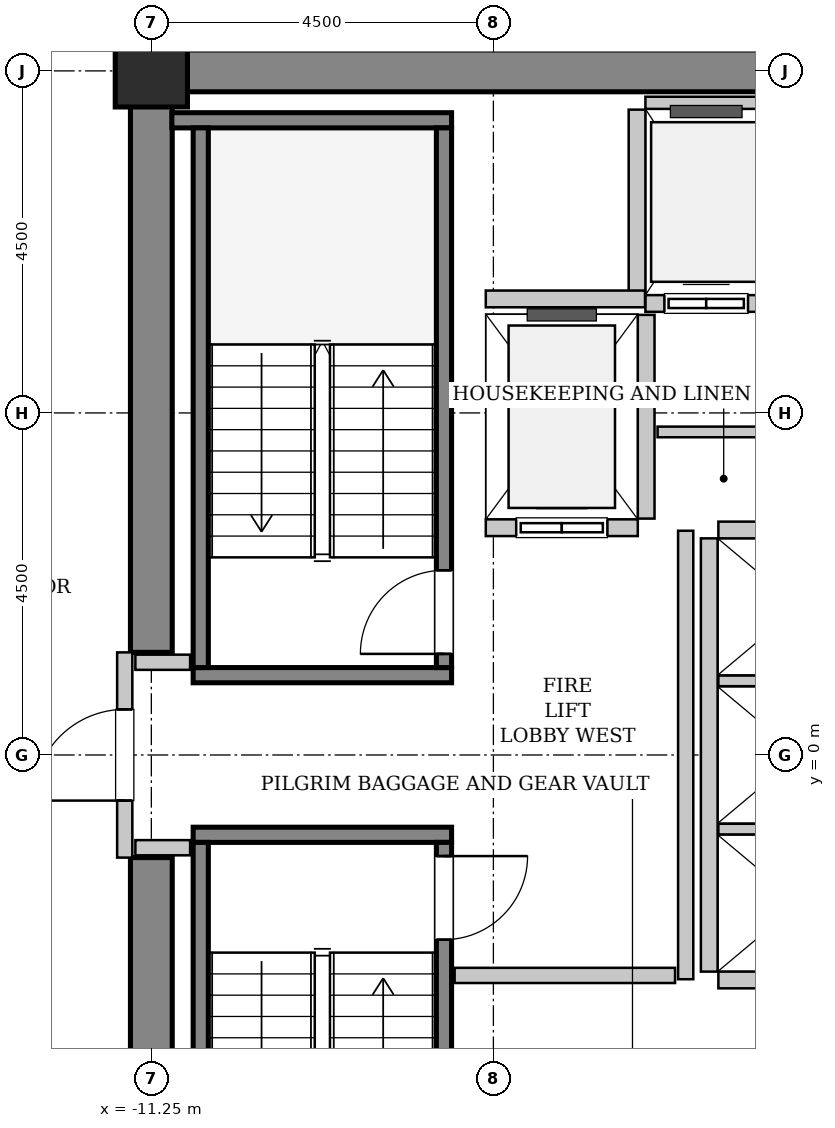
"""IFC4 building model, lengths in metres.
Left out: names, types, materials, properties, quantities, classifications, styles, units other than length and angle.
Written with IfcOpenShell. Run it as: python <this file> out.ifc"""

import sys

from ifc_helpers import new_model, si_unit, direction, frame, frame_2d, origin, origin_2d, place, context, subcontext, project, spatial, rectangle, hollow_rectangle, extrude, source, transform, mapped, element, fill, save


model = new_model("IFC4")
c1 = context("Model", 3, precision=1e-05, world=origin(), true_north=direction((0.0, 1.0)))
c2 = subcontext(c1, "Body", "Model", "MODEL_VIEW")
j1 = project(units=[si_unit("LENGTHUNIT", "METRE"), si_unit("PLANEANGLEUNIT", "RADIAN")], contexts=[c1])
p1 = place(None, origin())
s1 = spatial("IfcSite", under=j1, at=p1, CompositionType="ELEMENT")
p2 = place(p1, origin())
s2 = spatial("IfcBuilding", under=s1, at=p2, CompositionType="ELEMENT")
p3 = place(p2, frame((0.0, 0.0, 128.8)))
s3 = spatial("IfcBuildingStorey", under=s2, at=p3, CompositionType="ELEMENT", Elevation=128.8)
m1 = source(origin(), c2, "Body", "SweptSolid", [
    extrude(rectangle(XDim=9.975, YDim=0.55, at=frame_2d((4.987, 0.0))), origin(), (0.0, 0.0, 1.0), 3.8),
])
p4 = place(p3, frame((-11.525, 9.0, 0.0), z_axis=(0.0, 0.0, 1.0), x_axis=(1.0, 0.0, 0.0)))
e1 = element("IfcWall", 1, at=p4, inside=s3, PredefinedType="SHEAR", context=c2, shape_type="MappedRepresentation", body=[
    mapped(m1, transform((0.0, 0.0, 0.0), x_axis=(1.0, 0.0, 0.0), y_axis=(0.0, 1.0, 0.0), z_axis=(0.0, 0.0, 1.0), scale=1.0)),
])
m2 = source(origin(), c2, "Body", "SweptSolid", [
    extrude(rectangle(XDim=7.375, YDim=0.55, at=frame_2d((3.688, 0.0))), origin(), (0.0, 0.0, 1.0), 3.8),
])
for number, where, z_axis, x_axis in (
    (2, (-11.25, -8.725, 0.0), (0.0, 0.0, 1.0), (0.0, 1.0, 0.0)),
    (3, (-11.25, 1.35, 0.0), (0.0, 0.0, 1.0), (0.0, 1.0, 0.0)),
):
    element("IfcWall", number, at=place(p3, frame(where, z_axis=z_axis, x_axis=x_axis)), inside=s3, PredefinedType="SHEAR", context=c2, shape_type="MappedRepresentation", body=[
        mapped(m2, transform((0.0, 0.0, 0.0), x_axis=(1.0, 0.0, 0.0), y_axis=(0.0, 1.0, 0.0), z_axis=(0.0, 0.0, 1.0), scale=1.0)),
    ])
m3 = source(origin(), c2, "Body", "SweptSolid", [
    extrude(hollow_rectangle(XDim=0.95, YDim=0.95, WallThickness=0.045, InnerFilletRadius=0.045, OuterFilletRadius=0.09, at=origin_2d()), origin(), (0.0, 0.0, 1.0), 3.8),
])
p5 = place(p3, frame((-11.25, 9.0, 0.0), z_axis=(0.0, 0.0, 1.0), x_axis=(1.0, 0.0, 0.0)))
e4 = element("IfcColumn", 4, at=p5, inside=s3, PredefinedType="COLUMN", context=c2, shape_type="MappedRepresentation", body=[
    mapped(m3, transform((0.0, 0.0, 0.0), x_axis=(1.0, 0.0, 0.0), y_axis=(0.0, 1.0, 0.0), z_axis=(0.0, 0.0, 1.0), scale=1.0)),
])
m4 = source(origin(), c2, "Body", "SweptSolid", [
    extrude(rectangle(XDim=3.4, YDim=0.2, at=frame_2d((1.7, 0.0))), origin(), (0.0, 0.0, 1.0), 3.8),
])
p6 = place(p3, frame((-7.3, 1.05, 0.0), z_axis=(0.0, 0.0, 1.0), x_axis=(-1.0, 0.0, 0.0)))
e5 = element("IfcWall", 5, at=p6, inside=s3, PredefinedType="SOLIDWALL", context=c2, shape_type="MappedRepresentation", body=[
    mapped(m4, transform((0.0, 0.0, 0.0), x_axis=(1.0, 0.0, 0.0), y_axis=(0.0, 1.0, 0.0), z_axis=(0.0, 0.0, 1.0), scale=1.0)),
])
m5 = source(origin(), c2, "Body", "SweptSolid", [
    extrude(rectangle(XDim=3.68, YDim=0.2, at=frame_2d((1.84, 0.0))), origin(), (0.0, 0.0, 1.0), 3.8),
])
p7 = place(p3, frame((-7.3, 8.35, 0.0), z_axis=(0.0, 0.0, 1.0), x_axis=(-1.0, 0.0, 0.0)))
e6 = element("IfcWall", 6, at=p7, inside=s3, PredefinedType="SOLIDWALL", context=c2, shape_type="MappedRepresentation", body=[
    mapped(m5, transform((0.0, 0.0, 0.0), x_axis=(1.0, 0.0, 0.0), y_axis=(0.0, 1.0, 0.0), z_axis=(0.0, 0.0, 1.0), scale=1.0)),
])
m6 = source(origin(), c2, "Body", "SweptSolid", [
    extrude(rectangle(XDim=7.1, YDim=0.2, at=frame_2d((3.55, 0.0))), origin(), (0.0, 0.0, 1.0), 3.8),
])
p8 = place(p3, frame((-7.4, 1.15, 0.0), z_axis=(0.0, 0.0, 1.0), x_axis=(0.0, 1.0, 0.0)))
e7 = element("IfcWall", 7, at=p8, inside=s3, PredefinedType="SOLIDWALL", context=c2, shape_type="MappedRepresentation", body=[
    mapped(m6, transform((0.0, 0.0, 0.0), x_axis=(1.0, 0.0, 0.0), y_axis=(0.0, 1.0, 0.0), z_axis=(0.0, 0.0, 1.0), scale=1.0)),
])
p9 = place(p8, frame((0.18, 0.0, 0.0)))
e8 = element("IfcOpeningElement", 8, at=p9, cuts=e7, PredefinedType="OPENING", context=c2, shape_type="SweptSolid", body=[
    extrude(rectangle(XDim=1.1, YDim=2.15, at=frame_2d((0.55, 1.075))), frame((0.0, 0.11, 0.0), z_axis=(0.0, -1.0, 0.0), x_axis=(1.0, 0.0, 0.0)), (0.0, 0.0, 1.0), 0.22),
])
p10 = place(p3, frame((-10.6, 1.15, 0.0), z_axis=(0.0, 0.0, 1.0), x_axis=(0.0, 1.0, 0.0)))
e9 = element("IfcWall", 9, at=p10, inside=s3, PredefinedType="SOLIDWALL", context=c2, shape_type="MappedRepresentation", body=[
    mapped(m6, transform((0.0, 0.0, 0.0), x_axis=(1.0, 0.0, 0.0), y_axis=(0.0, 1.0, 0.0), z_axis=(0.0, 0.0, 1.0), scale=1.0)),
])
p11 = place(p3, frame((-10.7, -1.05, 0.0), z_axis=(0.0, 0.0, 1.0), x_axis=(1.0, 0.0, 0.0)))
e10 = element("IfcWall", 10, at=p11, inside=s3, PredefinedType="SOLIDWALL", context=c2, shape_type="MappedRepresentation", body=[
    mapped(m4, transform((0.0, 0.0, 0.0), x_axis=(1.0, 0.0, 0.0), y_axis=(0.0, 1.0, 0.0), z_axis=(0.0, 0.0, 1.0), scale=1.0)),
])
p12 = place(p3, frame((-10.6, -1.15, 0.0), z_axis=(0.0, 0.0, 1.0), x_axis=(0.0, -1.0, 0.0)))
e11 = element("IfcWall", 11, at=p12, inside=s3, PredefinedType="SOLIDWALL", context=c2, shape_type="MappedRepresentation", body=[
    mapped(m6, transform((0.0, 0.0, 0.0), x_axis=(1.0, 0.0, 0.0), y_axis=(0.0, 1.0, 0.0), z_axis=(0.0, 0.0, 1.0), scale=1.0)),
])
p13 = place(p3, frame((-7.4, -1.15, 0.0), z_axis=(0.0, 0.0, 1.0), x_axis=(0.0, -1.0, 0.0)))
e12 = element("IfcWall", 12, at=p13, inside=s3, PredefinedType="SOLIDWALL", context=c2, shape_type="MappedRepresentation", body=[
    mapped(m6, transform((0.0, 0.0, 0.0), x_axis=(1.0, 0.0, 0.0), y_axis=(0.0, 1.0, 0.0), z_axis=(0.0, 0.0, 1.0), scale=1.0)),
])
p14 = place(p13, frame((0.18, 0.0, 0.0)))
e13 = element("IfcOpeningElement", 13, at=p14, cuts=e12, PredefinedType="OPENING", context=c2, shape_type="SweptSolid", body=[
    extrude(rectangle(XDim=1.1, YDim=2.15, at=frame_2d((0.55, 1.075))), frame((0.0, 0.11, 0.0), z_axis=(0.0, -1.0, 0.0), x_axis=(1.0, 0.0, 0.0)), (0.0, 0.0, 1.0), 0.22),
])
m7 = source(origin(), c2, "Body", "SweptSolid", [
    extrude(rectangle(XDim=2.0, YDim=0.22, at=frame_2d((1.0, 0.0))), origin(), (0.0, 0.0, 1.0), 3.535),
])
p15 = place(p3, frame((-6.85, 2.99, 0.0), z_axis=(0.0, 0.0, 1.0), x_axis=(1.0, 0.0, 0.0)))
e14 = element("IfcWall", 14, at=p15, inside=s3, PredefinedType="SOLIDWALL", context=c2, shape_type="MappedRepresentation", body=[
    mapped(m7, transform((0.0, 0.0, 0.0), x_axis=(1.0, 0.0, 0.0), y_axis=(0.0, 1.0, 0.0), z_axis=(0.0, 0.0, 1.0), scale=1.0)),
])
p16 = place(p15, frame((0.4, 0.0, 0.0)))
e15 = element("IfcOpeningElement", 15, at=p16, cuts=e14, PredefinedType="OPENING", context=c2, shape_type="SweptSolid", body=[
    extrude(rectangle(XDim=1.2, YDim=2.2, at=frame_2d((0.6, 1.1))), frame((0.0, 0.12, 0.0), z_axis=(0.0, -1.0, 0.0), x_axis=(1.0, 0.0, 0.0)), (0.0, 0.0, 1.0), 0.24),
])
m8 = source(origin(), c2, "Body", "SweptSolid", [
    extrude(rectangle(XDim=2.68, YDim=0.22, at=frame_2d((1.34, 0.0))), origin(), (0.0, 0.0, 1.0), 3.535),
])
p17 = place(p3, frame((-4.74, 3.11, 0.0), z_axis=(0.0, 0.0, 1.0), x_axis=(0.0, 1.0, 0.0)))
e16 = element("IfcWall", 16, at=p17, inside=s3, PredefinedType="SOLIDWALL", context=c2, shape_type="MappedRepresentation", body=[
    mapped(m8, transform((0.0, 0.0, 0.0), x_axis=(1.0, 0.0, 0.0), y_axis=(0.0, 1.0, 0.0), z_axis=(0.0, 0.0, 1.0), scale=1.0)),
])
m9 = source(origin(), c2, "Body", "SweptSolid", [
    extrude(rectangle(XDim=3.2, YDim=0.22, at=frame_2d((1.6, 0.0))), origin(), (0.0, 0.0, 1.0), 3.535),
])
p18 = place(p3, frame((-4.75, 5.94, 0.0), z_axis=(0.0, 0.0, 1.0), x_axis=(1.0, 0.0, 0.0)))
e17 = element("IfcWall", 17, at=p18, inside=s3, PredefinedType="SOLIDWALL", context=c2, shape_type="MappedRepresentation", body=[
    mapped(m9, transform((0.0, 0.0, 0.0), x_axis=(1.0, 0.0, 0.0), y_axis=(0.0, 1.0, 0.0), z_axis=(0.0, 0.0, 1.0), scale=1.0)),
])
p19 = place(p18, frame((0.25, 0.0, 0.0)))
e18 = element("IfcOpeningElement", 18, at=p19, cuts=e17, PredefinedType="OPENING", context=c2, shape_type="SweptSolid", body=[
    extrude(rectangle(XDim=1.1, YDim=2.2, at=frame_2d((0.55, 1.1))), frame((0.0, 0.12, 0.0), z_axis=(0.0, -1.0, 0.0), x_axis=(1.0, 0.0, 0.0)), (0.0, 0.0, 1.0), 0.24),
])
p20 = place(p18, frame((1.875, 0.0, 0.0)))
e19 = element("IfcOpeningElement", 19, at=p20, cuts=e17, PredefinedType="OPENING", context=c2, shape_type="SweptSolid", body=[
    extrude(rectangle(XDim=1.1, YDim=2.2, at=frame_2d((0.55, 1.1))), frame((0.0, 0.12, 0.0), z_axis=(0.0, -1.0, 0.0), x_axis=(1.0, 0.0, 0.0)), (0.0, 0.0, 1.0), 0.24),
])
m10 = source(origin(), c2, "Body", "SweptSolid", [
    extrude(rectangle(XDim=3.2, YDim=0.16, at=frame_2d((1.6, 0.0))), origin(), (0.0, 0.0, 1.0), 2.425),
])
p21 = place(p3, frame((-1.55, 8.58, 0.0), z_axis=(0.0, 0.0, 1.0), x_axis=(-1.0, 0.0, 0.0)))
e20 = element("IfcWall", 20, at=p21, inside=s3, PredefinedType="PARTITIONING", context=c2, shape_type="MappedRepresentation", body=[
    mapped(m10, transform((0.0, 0.0, 0.0), x_axis=(1.0, 0.0, 0.0), y_axis=(0.0, 1.0, 0.0), z_axis=(0.0, 0.0, 1.0), scale=1.0)),
])
m11 = source(origin(), c2, "Body", "SweptSolid", [
    extrude(rectangle(XDim=2.43, YDim=0.22, at=frame_2d((1.215, 0.0))), origin(), (0.0, 0.0, 1.0), 3.535),
])
p22 = place(p3, frame((-4.86, 8.49, 0.0), z_axis=(0.0, 0.0, 1.0), x_axis=(0.0, -1.0, 0.0)))
e21 = element("IfcWall", 21, at=p22, inside=s3, PredefinedType="SOLIDWALL", context=c2, shape_type="MappedRepresentation", body=[
    mapped(m11, transform((0.0, 0.0, 0.0), x_axis=(1.0, 0.0, 0.0), y_axis=(0.0, 1.0, 0.0), z_axis=(0.0, 0.0, 1.0), scale=1.0)),
])
m12 = source(origin(), c2, "Body", "SweptSolid", [
    extrude(rectangle(XDim=5.7, YDim=0.22, at=frame_2d((2.85, 0.0))), origin(), (0.0, 0.0, 1.0), 3.535),
])
p23 = place(p3, frame((-3.91, 2.85, 0.0), z_axis=(0.0, 0.0, 1.0), x_axis=(0.0, -1.0, 0.0)))
e22 = element("IfcWall", 22, at=p23, inside=s3, PredefinedType="SOLIDWALL", context=c2, shape_type="MappedRepresentation", body=[
    mapped(m12, transform((0.0, 0.0, 0.0), x_axis=(1.0, 0.0, 0.0), y_axis=(0.0, 1.0, 0.0), z_axis=(0.0, 0.0, 1.0), scale=1.0)),
])
m13 = source(origin(), c2, "Body", "SweptSolid", [
    extrude(rectangle(XDim=2.13, YDim=0.22, at=frame_2d((1.065, 0.0))), origin(), (0.0, 0.0, 1.0), 3.535),
])
p24 = place(p3, frame((-3.79, -2.96, 0.0), z_axis=(0.0, 0.0, 1.0), x_axis=(1.0, 0.0, 0.0)))
e23 = element("IfcWall", 23, at=p24, inside=s3, PredefinedType="SOLIDWALL", context=c2, shape_type="MappedRepresentation", body=[
    mapped(m13, transform((0.0, 0.0, 0.0), x_axis=(1.0, 0.0, 0.0), y_axis=(0.0, 1.0, 0.0), z_axis=(0.0, 0.0, 1.0), scale=1.0)),
])
m14 = source(origin(), c2, "Body", "SweptSolid", [
    extrude(rectangle(XDim=2.13, YDim=0.14, at=frame_2d((1.065, 0.0))), origin(), (0.0, 0.0, 1.0), 3.535),
])
for number, where, z_axis, x_axis in (
    (24, (-3.79, -0.975, 0.0), (0.0, 0.0, 1.0), (1.0, 0.0, 0.0)),
    (25, (-3.79, 0.975, 0.0), (0.0, 0.0, 1.0), (1.0, 0.0, 0.0)),
):
    element("IfcWall", number, at=place(p3, frame(where, z_axis=z_axis, x_axis=x_axis)), inside=s3, PredefinedType="PARTITIONING", context=c2, shape_type="MappedRepresentation", body=[
        mapped(m14, transform((0.0, 0.0, 0.0), x_axis=(1.0, 0.0, 0.0), y_axis=(0.0, 1.0, 0.0), z_axis=(0.0, 0.0, 1.0), scale=1.0)),
    ])
p25 = place(p3, frame((-1.66, 2.96, 0.0), z_axis=(0.0, 0.0, 1.0), x_axis=(-1.0, 0.0, 0.0)))
e26 = element("IfcWall", 26, at=p25, inside=s3, PredefinedType="SOLIDWALL", context=c2, shape_type="MappedRepresentation", body=[
    mapped(m13, transform((0.0, 0.0, 0.0), x_axis=(1.0, 0.0, 0.0), y_axis=(0.0, 1.0, 0.0), z_axis=(0.0, 0.0, 1.0), scale=1.0)),
])
m15 = source(origin(), c2, "Body", "SweptSolid", [
    extrude(rectangle(XDim=2.095, YDim=0.22, at=frame_2d((1.048, 0.0))), origin(), (0.0, 0.0, 1.0), 3.535),
])
p26 = place(p3, frame((-6.85, 6.0, 0.0), z_axis=(0.0, 0.0, 1.0), x_axis=(1.0, 0.0, 0.0)))
e27 = element("IfcWall", 27, at=p26, inside=s3, PredefinedType="SOLIDWALL", context=c2, shape_type="MappedRepresentation", body=[
    mapped(m15, transform((0.0, 0.0, 0.0), x_axis=(1.0, 0.0, 0.0), y_axis=(0.0, 1.0, 0.0), z_axis=(0.0, 0.0, 1.0), scale=1.0)),
])
m16 = source(origin(), c2, "Body", "SweptSolid", [
    extrude(rectangle(XDim=2.7, YDim=0.2, at=frame_2d((1.35, 0.0))), origin(), (0.0, 0.0, 1.0), 2.425),
])
p27 = place(p3, frame((-11.6, -1.35, 0.0), z_axis=(0.0, 0.0, 1.0), x_axis=(0.0, 1.0, 0.0)))
e28 = element("IfcWall", 28, at=p27, inside=s3, PredefinedType="PARTITIONING", context=c2, shape_type="MappedRepresentation", body=[
    mapped(m16, transform((0.0, 0.0, 0.0), x_axis=(1.0, 0.0, 0.0), y_axis=(0.0, 1.0, 0.0), z_axis=(0.0, 0.0, 1.0), scale=1.0)),
])
p28 = place(p27, frame((0.75, 0.0, 0.0)))
e29 = element("IfcOpeningElement", 29, at=p28, cuts=e28, PredefinedType="OPENING", context=c2, shape_type="SweptSolid", body=[
    extrude(rectangle(XDim=1.2, YDim=2.15, at=frame_2d((0.6, 1.075))), frame((0.0, 0.11, 0.0), z_axis=(0.0, -1.0, 0.0), x_axis=(1.0, 0.0, 0.0)), (0.0, 0.0, 1.0), 0.22),
])
m17 = source(origin(), c2, "Body", "SweptSolid", [
    extrude(rectangle(XDim=5.9, YDim=0.2, at=frame_2d((2.95, 0.0))), origin(), (0.0, 0.0, 1.0), 3.535),
])
p29 = place(p3, frame((-4.22, -2.95, 0.0), z_axis=(0.0, 0.0, 1.0), x_axis=(0.0, 1.0, 0.0)))
e30 = element("IfcWall", 30, at=p29, inside=s3, PredefinedType="PARTITIONING", context=c2, shape_type="MappedRepresentation", body=[
    mapped(m17, transform((0.0, 0.0, 0.0), x_axis=(1.0, 0.0, 0.0), y_axis=(0.0, 1.0, 0.0), z_axis=(0.0, 0.0, 1.0), scale=1.0)),
])
m18 = source(origin(), c2, "Body", "SweptSolid", [
    extrude(rectangle(XDim=2.9, YDim=0.2, at=frame_2d((1.45, 0.0))), origin(), (0.0, 0.0, 1.0), 3.535),
])
p30 = place(p3, frame((-7.26, -2.9, 0.0), z_axis=(0.0, 0.0, 1.0), x_axis=(1.0, 0.0, 0.0)))
e31 = element("IfcWall", 31, at=p30, inside=s3, PredefinedType="PARTITIONING", context=c2, shape_type="MappedRepresentation", body=[
    mapped(m18, transform((0.0, 0.0, 0.0), x_axis=(1.0, 0.0, 0.0), y_axis=(0.0, 1.0, 0.0), z_axis=(0.0, 0.0, 1.0), scale=1.0)),
])
m19 = source(origin(), c2, "Body", "SweptSolid", [
    extrude(rectangle(XDim=0.72, YDim=0.2, at=frame_2d((0.36, 0.0))), origin(), (0.0, 0.0, 1.0), 3.535),
])
for number, where, z_axis, x_axis in (
    (32, (-11.46, 1.22, 0.0), (0.0, 0.0, 1.0), (1.0, 0.0, 0.0)),
    (33, (-11.46, -1.22, 0.0), (0.0, 0.0, 1.0), (1.0, 0.0, 0.0)),
):
    element("IfcWall", number, at=place(p3, frame(where, z_axis=z_axis, x_axis=x_axis)), inside=s3, PredefinedType="PARTITIONING", context=c2, shape_type="MappedRepresentation", body=[
        mapped(m19, transform((0.0, 0.0, 0.0), x_axis=(1.0, 0.0, 0.0), y_axis=(0.0, 1.0, 0.0), z_axis=(0.0, 0.0, 1.0), scale=1.0)),
    ])
m20 = source(origin(), c2, "Body", "SweptSolid", [
    extrude(rectangle(XDim=2.95, YDim=0.14, at=frame_2d((1.475, 0.0))), origin(), (0.0, 0.0, 1.0), 3.535),
])
p31 = place(p3, frame((-4.59, 4.25, 0.0), z_axis=(0.0, 0.0, 1.0), x_axis=(1.0, 0.0, 0.0)))
e34 = element("IfcWall", 34, at=p31, inside=s3, PredefinedType="PARTITIONING", context=c2, shape_type="MappedRepresentation", body=[
    mapped(m20, transform((0.0, 0.0, 0.0), x_axis=(1.0, 0.0, 0.0), y_axis=(0.0, 1.0, 0.0), z_axis=(0.0, 0.0, 1.0), scale=1.0)),
])
m21 = source(origin(), c2, "Body", "SweptSolid", [
    extrude(rectangle(XDim=1.1, YDim=2.15, at=frame_2d((0.55, 1.075))), frame((0.0, 0.025, 0.0), z_axis=(0.0, -1.0, 0.0), x_axis=(1.0, 0.0, 0.0)), (0.0, 0.0, 1.0), 0.05),
])
p32 = place(p9, origin())
e35 = element("IfcDoor", 35, at=p32, inside=s3, OperationType="SINGLE_SWING_LEFT", PredefinedType="DOOR", context=c2, shape_type="MappedRepresentation", body=[
    mapped(m21, transform((0.0, 0.0, 0.0), x_axis=(1.0, 0.0, 0.0), y_axis=(0.0, 1.0, 0.0), z_axis=(0.0, 0.0, 1.0), scale=1.0)),
])
fill(e8, e35)
p33 = place(p14, origin())
e36 = element("IfcDoor", 36, at=p33, inside=s3, OperationType="SINGLE_SWING_LEFT", PredefinedType="DOOR", context=c2, shape_type="MappedRepresentation", body=[
    mapped(m21, transform((0.0, 0.0, 0.0), x_axis=(1.0, 0.0, 0.0), y_axis=(0.0, 1.0, 0.0), z_axis=(0.0, 0.0, 1.0), scale=1.0)),
])
fill(e13, e36)
m22 = source(origin(), c2, "Body", "SweptSolid", [
    extrude(rectangle(XDim=1.2, YDim=2.2, at=frame_2d((0.6, 1.1))), frame((0.0, 0.025, 0.0), z_axis=(0.0, -1.0, 0.0), x_axis=(1.0, 0.0, 0.0)), (0.0, 0.0, 1.0), 0.05),
])
p34 = place(p16, origin())
e37 = element("IfcDoor", 37, at=p34, inside=s3, OperationType="SLIDING_TO_LEFT", PredefinedType="DOOR", context=c2, shape_type="MappedRepresentation", body=[
    mapped(m22, transform((0.0, 0.0, 0.0), x_axis=(1.0, 0.0, 0.0), y_axis=(0.0, 1.0, 0.0), z_axis=(0.0, 0.0, 1.0), scale=1.0)),
])
fill(e15, e37)
m23 = source(origin(), c2, "Body", "SweptSolid", [
    extrude(rectangle(XDim=1.1, YDim=2.2, at=frame_2d((0.55, 1.1))), frame((0.0, 0.025, 0.0), z_axis=(0.0, -1.0, 0.0), x_axis=(1.0, 0.0, 0.0)), (0.0, 0.0, 1.0), 0.05),
])
p35 = place(p19, origin())
e38 = element("IfcDoor", 38, at=p35, inside=s3, OperationType="DOUBLE_DOOR_SLIDING", PredefinedType="DOOR", context=c2, shape_type="MappedRepresentation", body=[
    mapped(m23, transform((0.0, 0.0, 0.0), x_axis=(1.0, 0.0, 0.0), y_axis=(0.0, 1.0, 0.0), z_axis=(0.0, 0.0, 1.0), scale=1.0)),
])
fill(e18, e38)
m24 = source(origin(), c2, "Body", "SweptSolid", [
    extrude(rectangle(XDim=1.2, YDim=2.15, at=frame_2d((0.6, 1.075))), frame((0.0, 0.025, 0.0), z_axis=(0.0, -1.0, 0.0), x_axis=(1.0, 0.0, 0.0)), (0.0, 0.0, 1.0), 0.05),
])
p36 = place(p28, origin())
e39 = element("IfcDoor", 39, at=p36, inside=s3, OperationType="SINGLE_SWING_LEFT", PredefinedType="DOOR", context=c2, shape_type="MappedRepresentation", body=[
    mapped(m24, transform((0.0, 0.0, 0.0), x_axis=(1.0, 0.0, 0.0), y_axis=(0.0, 1.0, 0.0), z_axis=(0.0, 0.0, 1.0), scale=1.0)),
])
fill(e29, e39)
save(model, sys.argv[1])
